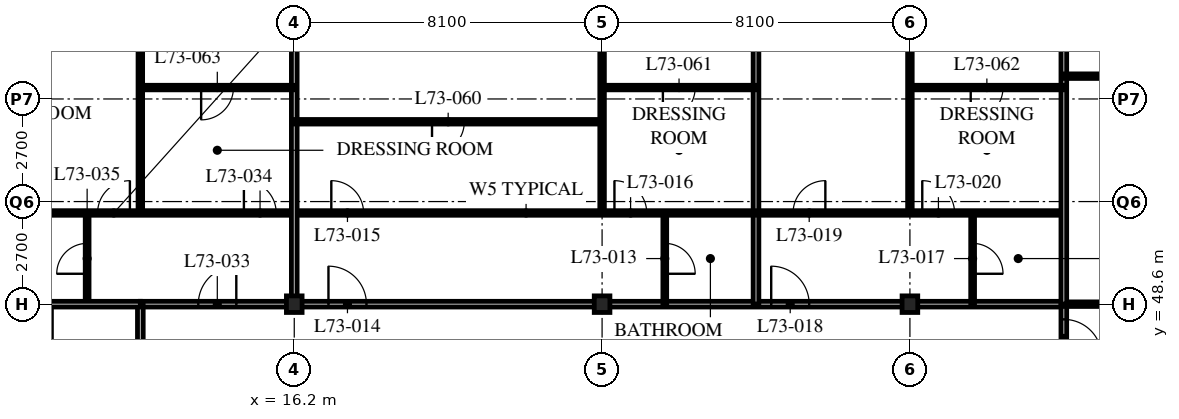
"""IFC4 building model, lengths in metres.
Left out: names, types, materials, properties, quantities, classifications, styles, units other than length and angle.
Written with IfcOpenShell. Run it as: python <this file> out.ifc"""

import sys

from ifc_helpers import new_model, si_unit, direction, frame, frame_2d, origin, origin_2d, place, context, subcontext, project, spatial, rectangle, i_section, extrude, element, fill, save


model = new_model("IFC4")
c1 = context("Model", 3, precision=1e-05, world=origin(), true_north=direction((0.0, 1.0)))
c2 = subcontext(c1, "Body", "Model", "MODEL_VIEW")
j1 = project(units=[si_unit("LENGTHUNIT", "METRE"), si_unit("PLANEANGLEUNIT", "RADIAN")], contexts=[c1])
p1 = place(None, origin())
s1 = spatial("IfcSite", under=j1, at=p1, CompositionType="ELEMENT")
p2 = place(p1, origin())
s2 = spatial("IfcBuilding", under=s1, at=p2, CompositionType="ELEMENT")
p3 = place(p2, frame((0.0, 0.0, 285.3)))
s3 = spatial("IfcBuildingStorey", under=s2, at=p3, CompositionType="ELEMENT", Elevation=285.3)
for number, where, z_axis, x_axis in (
    (1, (16.2, 48.6, 0.0), (0.0, 0.0, 1.0), (1.0, 0.0, 0.0)),
    (2, (24.3, 48.6, 0.0), (0.0, 0.0, 1.0), (1.0, 0.0, 0.0)),
    (3, (32.4, 48.6, 0.0), (0.0, 0.0, 1.0), (1.0, 0.0, 0.0)),
):
    element("IfcColumn", number, at=place(p3, frame(where, z_axis=z_axis, x_axis=x_axis)), inside=s3, PredefinedType="COLUMN", context=c2, shape_type="SweptSolid", body=[
        extrude(i_section(OverallWidth=0.412, OverallDepth=0.437, WebThickness=0.036, FlangeThickness=0.058, FilletRadius=0.015, at=origin_2d()), origin(), (0.0, 0.0, 1.0), 3.9),
    ])
p4 = place(p3, frame((12.15, 48.6, 0.0), z_axis=(0.0, 0.0, 1.0), x_axis=(1.0, 0.0, 0.0)))
e4 = element("IfcWall", 4, at=p4, inside=s3, PredefinedType="PARTITIONING", context=c2, shape_type="SweptSolid", body=[
    extrude(rectangle(XDim=24.3, YDim=0.15, at=frame_2d((12.15, 0.0))), origin(), (0.0, 0.0, 1.0), 3.078),
])
p5 = place(p4, frame((4.95, 0.0, 0.0)))
e5 = element("IfcOpeningElement", 5, at=p5, cuts=e4, PredefinedType="OPENING", context=c2, shape_type="SweptSolid", body=[
    extrude(rectangle(XDim=1.0, YDim=2.1, at=frame_2d((0.5, 1.05))), frame((0.0, 0.085, 0.0), z_axis=(0.0, -1.0, 0.0), x_axis=(1.0, 0.0, 0.0)), (0.0, 0.0, 1.0), 0.17),
])
p6 = place(p4, frame((16.6, 0.0, 0.0)))
e6 = element("IfcOpeningElement", 6, at=p6, cuts=e4, PredefinedType="OPENING", context=c2, shape_type="SweptSolid", body=[
    extrude(rectangle(XDim=1.0, YDim=2.1, at=frame_2d((0.5, 1.05))), frame((0.0, 0.085, 0.0), z_axis=(0.0, -1.0, 0.0), x_axis=(1.0, 0.0, 0.0)), (0.0, 0.0, 1.0), 0.17),
])
p7 = place(p4, frame((1.525, 0.0, 0.0)))
e7 = element("IfcOpeningElement", 7, at=p7, cuts=e4, PredefinedType="OPENING", context=c2, shape_type="SweptSolid", body=[
    extrude(rectangle(XDim=1.0, YDim=2.1, at=frame_2d((0.5, 1.05))), frame((0.0, 0.085, 0.0), z_axis=(0.0, -1.0, 0.0), x_axis=(1.0, 0.0, 0.0)), (0.0, 0.0, 1.0), 0.17),
])
p8 = place(p3, frame((12.15, 22.5, 0.0), z_axis=(0.0, 0.0, 1.0), x_axis=(0.0, 1.0, 0.0)))
e8 = element("IfcWall", 8, at=p8, inside=s3, PredefinedType="PARTITIONING", context=c2, shape_type="SweptSolid", body=[
    extrude(rectangle(XDim=26.1, YDim=0.15, at=frame_2d((13.05, 0.0))), origin(), (0.0, 0.0, 1.0), 3.69),
])
p9 = place(p8, frame((0.4, 0.0, 0.0)))
e9 = element("IfcOpeningElement", 9, at=p9, cuts=e8, PredefinedType="OPENING", context=c2, shape_type="SweptSolid", body=[
    extrude(rectangle(XDim=1.0, YDim=2.1, at=frame_2d((0.5, 1.05))), frame((0.0, 0.085, 0.0), z_axis=(0.0, -1.0, 0.0), x_axis=(1.0, 0.0, 0.0)), (0.0, 0.0, 1.0), 0.17),
])
p10 = place(p3, frame((36.45, 46.8, 0.0), z_axis=(0.0, 0.0, 1.0), x_axis=(0.0, 1.0, 0.0)))
e10 = element("IfcWall", 10, at=p10, inside=s3, PredefinedType="PARTITIONING", context=c2, shape_type="SweptSolid", body=[
    extrude(rectangle(XDim=1.8, YDim=0.15, at=frame_2d((0.9, 0.0))), origin(), (0.0, 0.0, 1.0), 3.69),
])
p11 = place(p10, frame((0.4, 0.0, 0.0)))
e11 = element("IfcOpeningElement", 11, at=p11, cuts=e10, PredefinedType="OPENING", context=c2, shape_type="SweptSolid", body=[
    extrude(rectangle(XDim=1.0, YDim=2.1, at=frame_2d((0.5, 1.05))), frame((0.0, 0.085, 0.0), z_axis=(0.0, -1.0, 0.0), x_axis=(1.0, 0.0, 0.0)), (0.0, 0.0, 1.0), 0.17),
])
p12 = place(p3, frame((25.95, 48.6, 0.0), z_axis=(0.0, 0.0, 1.0), x_axis=(0.0, 1.0, 0.0)))
e12 = element("IfcWall", 12, at=p12, inside=s3, PredefinedType="PARTITIONING", context=c2, shape_type="SweptSolid", body=[
    extrude(rectangle(XDim=2.4, YDim=0.1, at=frame_2d((1.2, 0.0))), origin(), (0.0, 0.0, 1.0), 3.69),
])
p13 = place(p12, frame((0.8, 0.0, 0.0)))
e13 = element("IfcOpeningElement", 13, at=p13, cuts=e12, PredefinedType="OPENING", context=c2, shape_type="SweptSolid", body=[
    extrude(rectangle(XDim=0.8, YDim=2.1, at=frame_2d((0.4, 1.05))), frame((0.0, 0.06, 0.0), z_axis=(0.0, -1.0, 0.0), x_axis=(1.0, 0.0, 0.0)), (0.0, 0.0, 1.0), 0.12),
])
p14 = place(p3, frame((24.3, 51.0, 0.0), z_axis=(0.0, 0.0, 1.0), x_axis=(0.0, 1.0, 0.0)))
e14 = element("IfcWall", 14, at=p14, inside=s3, PredefinedType="PARTITIONING", context=c2, shape_type="SweptSolid", body=[
    extrude(rectangle(XDim=13.5, YDim=0.12, at=frame_2d((6.75, 0.0))), origin(), (0.0, 0.0, 1.0), 3.078),
])
p15 = place(p3, frame((28.35, 48.6, 0.0), z_axis=(0.0, 0.0, 1.0), x_axis=(0.0, 1.0, 0.0)))
e15 = element("IfcWall", 15, at=p15, inside=s3, PredefinedType="PARTITIONING", context=c2, shape_type="SweptSolid", body=[
    extrude(rectangle(XDim=15.9, YDim=0.15, at=frame_2d((7.95, 0.0))), origin(), (0.0, 0.0, 1.0), 3.69),
])
p16 = place(p3, frame((34.05, 48.6, 0.0), z_axis=(0.0, 0.0, 1.0), x_axis=(0.0, 1.0, 0.0)))
e16 = element("IfcWall", 16, at=p16, inside=s3, PredefinedType="PARTITIONING", context=c2, shape_type="SweptSolid", body=[
    extrude(rectangle(XDim=2.4, YDim=0.1, at=frame_2d((1.2, 0.0))), origin(), (0.0, 0.0, 1.0), 3.69),
])
p17 = place(p16, frame((0.8, 0.0, 0.0)))
e17 = element("IfcOpeningElement", 17, at=p17, cuts=e16, PredefinedType="OPENING", context=c2, shape_type="SweptSolid", body=[
    extrude(rectangle(XDim=0.8, YDim=2.1, at=frame_2d((0.4, 1.05))), frame((0.0, 0.06, 0.0), z_axis=(0.0, -1.0, 0.0), x_axis=(1.0, 0.0, 0.0)), (0.0, 0.0, 1.0), 0.12),
])
p18 = place(p3, frame((32.4, 51.0, 0.0), z_axis=(0.0, 0.0, 1.0), x_axis=(0.0, 1.0, 0.0)))
e18 = element("IfcWall", 18, at=p18, inside=s3, PredefinedType="PARTITIONING", context=c2, shape_type="SweptSolid", body=[
    extrude(rectangle(XDim=13.5, YDim=0.12, at=frame_2d((6.75, 0.0))), origin(), (0.0, 0.0, 1.0), 3.078),
])
p19 = place(p3, frame((10.75, 48.6, 0.0), z_axis=(0.0, 0.0, 1.0), x_axis=(0.0, 1.0, 0.0)))
e19 = element("IfcWall", 19, at=p19, inside=s3, PredefinedType="PARTITIONING", context=c2, shape_type="SweptSolid", body=[
    extrude(rectangle(XDim=2.4, YDim=0.1, at=frame_2d((1.2, 0.0))), origin(), (0.0, 0.0, 1.0), 3.69),
])
p20 = place(p19, frame((0.8, 0.0, 0.0)))
e20 = element("IfcOpeningElement", 20, at=p20, cuts=e19, PredefinedType="OPENING", context=c2, shape_type="SweptSolid", body=[
    extrude(rectangle(XDim=0.8, YDim=2.1, at=frame_2d((0.4, 1.05))), frame((0.0, 0.06, 0.0), z_axis=(0.0, -1.0, 0.0), x_axis=(1.0, 0.0, 0.0)), (0.0, 0.0, 1.0), 0.12),
])
p21 = place(p3, frame((8.15, 51.0, 0.0), z_axis=(0.0, 0.0, 1.0), x_axis=(1.0, 0.0, 0.0)))
e21 = element("IfcWall", 21, at=p21, inside=s3, PredefinedType="PARTITIONING", context=c2, shape_type="SweptSolid", body=[
    extrude(rectangle(XDim=28.3, YDim=0.12, at=frame_2d((14.15, 0.0))), origin(), (0.0, 0.0, 1.0), 3.69),
])
p22 = place(p21, frame((9.025, 0.0, 0.0)))
e22 = element("IfcOpeningElement", 22, at=p22, cuts=e21, PredefinedType="OPENING", context=c2, shape_type="SweptSolid", body=[
    extrude(rectangle(XDim=0.85, YDim=2.1, at=frame_2d((0.425, 1.05))), frame((0.0, 0.07, 0.0), z_axis=(0.0, -1.0, 0.0), x_axis=(1.0, 0.0, 0.0)), (0.0, 0.0, 1.0), 0.14),
])
p23 = place(p21, frame((16.475, 0.0, 0.0)))
e23 = element("IfcOpeningElement", 23, at=p23, cuts=e21, PredefinedType="OPENING", context=c2, shape_type="SweptSolid", body=[
    extrude(rectangle(XDim=0.85, YDim=2.1, at=frame_2d((0.425, 1.05))), frame((0.0, 0.07, 0.0), z_axis=(0.0, -1.0, 0.0), x_axis=(1.0, 0.0, 0.0)), (0.0, 0.0, 1.0), 0.14),
])
p24 = place(p21, frame((21.175, 0.0, 0.0)))
e24 = element("IfcOpeningElement", 24, at=p24, cuts=e21, PredefinedType="OPENING", context=c2, shape_type="SweptSolid", body=[
    extrude(rectangle(XDim=0.85, YDim=2.1, at=frame_2d((0.425, 1.05))), frame((0.0, 0.07, 0.0), z_axis=(0.0, -1.0, 0.0), x_axis=(1.0, 0.0, 0.0)), (0.0, 0.0, 1.0), 0.14),
])
p25 = place(p21, frame((24.575, 0.0, 0.0)))
e25 = element("IfcOpeningElement", 25, at=p25, cuts=e21, PredefinedType="OPENING", context=c2, shape_type="SweptSolid", body=[
    extrude(rectangle(XDim=0.85, YDim=2.1, at=frame_2d((0.425, 1.05))), frame((0.0, 0.07, 0.0), z_axis=(0.0, -1.0, 0.0), x_axis=(1.0, 0.0, 0.0)), (0.0, 0.0, 1.0), 0.14),
])
p26 = place(p21, frame((6.725, 0.0, 0.0)))
e26 = element("IfcOpeningElement", 26, at=p26, cuts=e21, PredefinedType="OPENING", context=c2, shape_type="SweptSolid", body=[
    extrude(rectangle(XDim=0.85, YDim=2.1, at=frame_2d((0.425, 1.05))), frame((0.0, 0.07, 0.0), z_axis=(0.0, -1.0, 0.0), x_axis=(1.0, 0.0, 0.0)), (0.0, 0.0, 1.0), 0.14),
])
p27 = place(p21, frame((2.875, 0.0, 0.0)))
e27 = element("IfcOpeningElement", 27, at=p27, cuts=e21, PredefinedType="OPENING", context=c2, shape_type="SweptSolid", body=[
    extrude(rectangle(XDim=0.85, YDim=2.1, at=frame_2d((0.425, 1.05))), frame((0.0, 0.07, 0.0), z_axis=(0.0, -1.0, 0.0), x_axis=(1.0, 0.0, 0.0)), (0.0, 0.0, 1.0), 0.14),
])
p28 = place(p3, frame((12.15, 51.0, 0.0), z_axis=(0.0, 0.0, 1.0), x_axis=(0.0, 1.0, 0.0)))
e28 = element("IfcWall", 28, at=p28, inside=s3, PredefinedType="PARTITIONING", context=c2, shape_type="SweptSolid", body=[
    extrude(rectangle(XDim=13.5, YDim=0.12, at=frame_2d((6.75, 0.0))), origin(), (0.0, 0.0, 1.0), 3.69),
])
p29 = place(p3, frame((0.3, 48.6, 0.0), z_axis=(0.0, 0.0, 1.0), x_axis=(1.0, 0.0, 0.0)))
e29 = element("IfcWall", 29, at=p29, inside=s3, PredefinedType="PARTITIONING", context=c2, shape_type="SweptSolid", body=[
    extrude(rectangle(XDim=11.85, YDim=0.15, at=frame_2d((5.925, 0.0))), origin(), (0.0, 0.0, 1.0), 3.078),
])
p30 = place(p3, frame((16.2, 48.6, 0.0), z_axis=(0.0, 0.0, 1.0), x_axis=(0.0, 1.0, 0.0)))
e30 = element("IfcWall", 30, at=p30, inside=s3, PredefinedType="PARTITIONING", context=c2, shape_type="SweptSolid", body=[
    extrude(rectangle(XDim=15.9, YDim=0.15, at=frame_2d((7.95, 0.0))), origin(), (0.0, 0.0, 1.0), 3.078),
])
p31 = place(p3, frame((36.45, 48.6, 0.0), z_axis=(0.0, 0.0, 1.0), x_axis=(1.0, 0.0, 0.0)))
e31 = element("IfcWall", 31, at=p31, inside=s3, PredefinedType="PARTITIONING", context=c2, shape_type="SweptSolid", body=[
    extrude(rectangle(XDim=6.45, YDim=0.12, at=frame_2d((3.225, 0.0))), origin(), (0.0, 0.0, 1.0), 3.078),
])
p32 = place(p31, frame((2.3, 0.0, 0.0)))
e32 = element("IfcOpeningElement", 32, at=p32, cuts=e31, PredefinedType="OPENING", context=c2, shape_type="SweptSolid", body=[
    extrude(rectangle(XDim=0.85, YDim=2.1, at=frame_2d((0.425, 1.05))), frame((0.0, 0.07, 0.0), z_axis=(0.0, -1.0, 0.0), x_axis=(1.0, 0.0, 0.0)), (0.0, 0.0, 1.0), 0.14),
])
p33 = place(p3, frame((36.45, 64.5, 0.0), z_axis=(0.0, 0.0, 1.0), x_axis=(0.0, -1.0, 0.0)))
e33 = element("IfcWall", 33, at=p33, inside=s3, PredefinedType="PARTITIONING", context=c2, shape_type="SweptSolid", body=[
    extrude(rectangle(XDim=15.9, YDim=0.15, at=frame_2d((7.95, 0.0))), origin(), (0.0, 0.0, 1.0), 3.69),
])
p34 = place(p3, frame((36.45, 54.6, 0.0), z_axis=(0.0, 0.0, 1.0), x_axis=(1.0, 0.0, 0.0)))
e34 = element("IfcWall", 34, at=p34, inside=s3, PredefinedType="PARTITIONING", context=c2, shape_type="SweptSolid", body=[
    extrude(rectangle(XDim=19.95, YDim=0.12, at=frame_2d((9.975, 0.0))), origin(), (0.0, 0.0, 1.0), 3.69),
])
p35 = place(p34, frame((1.675, 0.0, 0.0)))
e35 = element("IfcOpeningElement", 35, at=p35, cuts=e34, PredefinedType="OPENING", context=c2, shape_type="SweptSolid", body=[
    extrude(rectangle(XDim=0.85, YDim=2.1, at=frame_2d((0.425, 1.05))), frame((0.0, 0.07, 0.0), z_axis=(0.0, -1.0, 0.0), x_axis=(1.0, 0.0, 0.0)), (0.0, 0.0, 1.0), 0.14),
])
p36 = place(p3, frame((16.2, 53.4, 0.0), z_axis=(0.0, 0.0, 1.0), x_axis=(1.0, 0.0, 0.0)))
e36 = element("IfcWall", 36, at=p36, inside=s3, PredefinedType="PARTITIONING", context=c2, shape_type="SweptSolid", body=[
    extrude(rectangle(XDim=8.1, YDim=0.12, at=frame_2d((4.05, 0.0))), origin(), (0.0, 0.0, 1.0), 3.69),
])
p37 = place(p36, frame((3.625, 0.0, 0.0)))
e37 = element("IfcOpeningElement", 37, at=p37, cuts=e36, PredefinedType="OPENING", context=c2, shape_type="SweptSolid", body=[
    extrude(rectangle(XDim=0.85, YDim=2.1, at=frame_2d((0.425, 1.05))), frame((0.0, 0.07, 0.0), z_axis=(0.0, -1.0, 0.0), x_axis=(1.0, 0.0, 0.0)), (0.0, 0.0, 1.0), 0.14),
])
p38 = place(p3, frame((24.3, 54.3, 0.0), z_axis=(0.0, 0.0, 1.0), x_axis=(1.0, 0.0, 0.0)))
e38 = element("IfcWall", 38, at=p38, inside=s3, PredefinedType="PARTITIONING", context=c2, shape_type="SweptSolid", body=[
    extrude(rectangle(XDim=4.05, YDim=0.12, at=frame_2d((2.025, 0.0))), origin(), (0.0, 0.0, 1.0), 3.69),
])
p39 = place(p38, frame((1.6, 0.0, 0.0)))
e39 = element("IfcOpeningElement", 39, at=p39, cuts=e38, PredefinedType="OPENING", context=c2, shape_type="SweptSolid", body=[
    extrude(rectangle(XDim=0.85, YDim=2.1, at=frame_2d((0.425, 1.05))), frame((0.0, 0.07, 0.0), z_axis=(0.0, -1.0, 0.0), x_axis=(1.0, 0.0, 0.0)), (0.0, 0.0, 1.0), 0.14),
])
p40 = place(p3, frame((32.4, 54.3, 0.0), z_axis=(0.0, 0.0, 1.0), x_axis=(1.0, 0.0, 0.0)))
e40 = element("IfcWall", 40, at=p40, inside=s3, PredefinedType="PARTITIONING", context=c2, shape_type="SweptSolid", body=[
    extrude(rectangle(XDim=4.05, YDim=0.12, at=frame_2d((2.025, 0.0))), origin(), (0.0, 0.0, 1.0), 3.69),
])
p41 = place(p40, frame((1.6, 0.0, 0.0)))
e41 = element("IfcOpeningElement", 41, at=p41, cuts=e40, PredefinedType="OPENING", context=c2, shape_type="SweptSolid", body=[
    extrude(rectangle(XDim=0.85, YDim=2.1, at=frame_2d((0.425, 1.05))), frame((0.0, 0.07, 0.0), z_axis=(0.0, -1.0, 0.0), x_axis=(1.0, 0.0, 0.0)), (0.0, 0.0, 1.0), 0.14),
])
p42 = place(p3, frame((12.15, 54.3, 0.0), z_axis=(0.0, 0.0, 1.0), x_axis=(1.0, 0.0, 0.0)))
e42 = element("IfcWall", 42, at=p42, inside=s3, PredefinedType="PARTITIONING", context=c2, shape_type="SweptSolid", body=[
    extrude(rectangle(XDim=4.05, YDim=0.12, at=frame_2d((2.025, 0.0))), origin(), (0.0, 0.0, 1.0), 3.69),
])
p43 = place(p42, frame((1.6, 0.0, 0.0)))
e43 = element("IfcOpeningElement", 43, at=p43, cuts=e42, PredefinedType="OPENING", context=c2, shape_type="SweptSolid", body=[
    extrude(rectangle(XDim=0.85, YDim=2.1, at=frame_2d((0.425, 1.05))), frame((0.0, 0.07, 0.0), z_axis=(0.0, -1.0, 0.0), x_axis=(1.0, 0.0, 0.0)), (0.0, 0.0, 1.0), 0.14),
])
p44 = place(p13, origin())
e44 = element("IfcDoor", 44, at=p44, inside=s3, OperationType="SINGLE_SWING_RIGHT", PredefinedType="DOOR", context=c2, shape_type="SweptSolid", body=[
    extrude(rectangle(XDim=0.8, YDim=2.1, at=frame_2d((0.4, 1.05))), frame((0.0, 0.025, 0.0), z_axis=(0.0, -1.0, 0.0), x_axis=(1.0, 0.0, 0.0)), (0.0, 0.0, 1.0), 0.05),
])
fill(e13, e44)
p45 = place(p5, origin())
e45 = element("IfcDoor", 45, at=p45, inside=s3, OperationType="SINGLE_SWING_LEFT", PredefinedType="DOOR", context=c2, shape_type="SweptSolid", body=[
    extrude(rectangle(XDim=1.0, YDim=2.1, at=frame_2d((0.5, 1.05))), frame((0.0, 0.025, 0.0), z_axis=(0.0, -1.0, 0.0), x_axis=(1.0, 0.0, 0.0)), (0.0, 0.0, 1.0), 0.05),
])
fill(e5, e45)
p46 = place(p22, origin())
e46 = element("IfcDoor", 46, at=p46, inside=s3, OperationType="SINGLE_SWING_LEFT", PredefinedType="DOOR", context=c2, shape_type="SweptSolid", body=[
    extrude(rectangle(XDim=0.85, YDim=2.1, at=frame_2d((0.425, 1.05))), frame((0.0, 0.025, 0.0), z_axis=(0.0, -1.0, 0.0), x_axis=(1.0, 0.0, 0.0)), (0.0, 0.0, 1.0), 0.05),
])
fill(e22, e46)
p47 = place(p23, origin())
e47 = element("IfcDoor", 47, at=p47, inside=s3, OperationType="SINGLE_SWING_LEFT", PredefinedType="DOOR", context=c2, shape_type="SweptSolid", body=[
    extrude(rectangle(XDim=0.85, YDim=2.1, at=frame_2d((0.425, 1.05))), frame((0.0, 0.025, 0.0), z_axis=(0.0, -1.0, 0.0), x_axis=(1.0, 0.0, 0.0)), (0.0, 0.0, 1.0), 0.05),
])
fill(e23, e47)
p48 = place(p17, origin())
e48 = element("IfcDoor", 48, at=p48, inside=s3, OperationType="SINGLE_SWING_RIGHT", PredefinedType="DOOR", context=c2, shape_type="SweptSolid", body=[
    extrude(rectangle(XDim=0.8, YDim=2.1, at=frame_2d((0.4, 1.05))), frame((0.0, 0.025, 0.0), z_axis=(0.0, -1.0, 0.0), x_axis=(1.0, 0.0, 0.0)), (0.0, 0.0, 1.0), 0.05),
])
fill(e17, e48)
p49 = place(p6, origin())
e49 = element("IfcDoor", 49, at=p49, inside=s3, OperationType="SINGLE_SWING_LEFT", PredefinedType="DOOR", context=c2, shape_type="SweptSolid", body=[
    extrude(rectangle(XDim=1.0, YDim=2.1, at=frame_2d((0.5, 1.05))), frame((0.0, 0.025, 0.0), z_axis=(0.0, -1.0, 0.0), x_axis=(1.0, 0.0, 0.0)), (0.0, 0.0, 1.0), 0.05),
])
fill(e6, e49)
p50 = place(p24, origin())
e50 = element("IfcDoor", 50, at=p50, inside=s3, OperationType="SINGLE_SWING_RIGHT", PredefinedType="DOOR", context=c2, shape_type="SweptSolid", body=[
    extrude(rectangle(XDim=0.85, YDim=2.1, at=frame_2d((0.425, 1.05))), frame((0.0, 0.025, 0.0), z_axis=(0.0, -1.0, 0.0), x_axis=(1.0, 0.0, 0.0)), (0.0, 0.0, 1.0), 0.05),
])
fill(e24, e50)
p51 = place(p25, origin())
e51 = element("IfcDoor", 51, at=p51, inside=s3, OperationType="SINGLE_SWING_LEFT", PredefinedType="DOOR", context=c2, shape_type="SweptSolid", body=[
    extrude(rectangle(XDim=0.85, YDim=2.1, at=frame_2d((0.425, 1.05))), frame((0.0, 0.025, 0.0), z_axis=(0.0, -1.0, 0.0), x_axis=(1.0, 0.0, 0.0)), (0.0, 0.0, 1.0), 0.05),
])
fill(e25, e51)
p52 = place(p7, origin())
e52 = element("IfcDoor", 52, at=p52, inside=s3, OperationType="SINGLE_SWING_RIGHT", PredefinedType="DOOR", context=c2, shape_type="SweptSolid", body=[
    extrude(rectangle(XDim=1.0, YDim=2.1, at=frame_2d((0.5, 1.05))), frame((0.0, 0.025, 0.0), z_axis=(0.0, -1.0, 0.0), x_axis=(1.0, 0.0, 0.0)), (0.0, 0.0, 1.0), 0.05),
])
fill(e7, e52)
p53 = place(p26, origin())
e53 = element("IfcDoor", 53, at=p53, inside=s3, OperationType="SINGLE_SWING_LEFT", PredefinedType="DOOR", context=c2, shape_type="SweptSolid", body=[
    extrude(rectangle(XDim=0.85, YDim=2.1, at=frame_2d((0.425, 1.05))), frame((0.0, 0.025, 0.0), z_axis=(0.0, -1.0, 0.0), x_axis=(1.0, 0.0, 0.0)), (0.0, 0.0, 1.0), 0.05),
])
fill(e26, e53)
p54 = place(p20, origin())
e54 = element("IfcDoor", 54, at=p54, inside=s3, OperationType="SINGLE_SWING_LEFT", PredefinedType="DOOR", context=c2, shape_type="SweptSolid", body=[
    extrude(rectangle(XDim=0.8, YDim=2.1, at=frame_2d((0.4, 1.05))), frame((0.0, 0.025, 0.0), z_axis=(0.0, -1.0, 0.0), x_axis=(1.0, 0.0, 0.0)), (0.0, 0.0, 1.0), 0.05),
])
fill(e20, e54)
p55 = place(p27, origin())
e55 = element("IfcDoor", 55, at=p55, inside=s3, OperationType="SINGLE_SWING_RIGHT", PredefinedType="DOOR", context=c2, shape_type="SweptSolid", body=[
    extrude(rectangle(XDim=0.85, YDim=2.1, at=frame_2d((0.425, 1.05))), frame((0.0, 0.025, 0.0), z_axis=(0.0, -1.0, 0.0), x_axis=(1.0, 0.0, 0.0)), (0.0, 0.0, 1.0), 0.05),
])
fill(e27, e55)
p56 = place(p11, origin())
e56 = element("IfcDoor", 56, at=p56, inside=s3, OperationType="SINGLE_SWING_RIGHT", PredefinedType="DOOR", context=c2, shape_type="SweptSolid", body=[
    extrude(rectangle(XDim=1.0, YDim=2.1, at=frame_2d((0.5, 1.05))), frame((0.0, 0.025, 0.0), z_axis=(0.0, -1.0, 0.0), x_axis=(1.0, 0.0, 0.0)), (0.0, 0.0, 1.0), 0.05),
])
fill(e11, e56)
p57 = place(p37, origin())
e57 = element("IfcDoor", 57, at=p57, inside=s3, OperationType="SINGLE_SWING_RIGHT", PredefinedType="DOOR", context=c2, shape_type="SweptSolid", body=[
    extrude(rectangle(XDim=0.85, YDim=2.1, at=frame_2d((0.425, 1.05))), frame((0.0, 0.025, 0.0), z_axis=(0.0, -1.0, 0.0), x_axis=(1.0, 0.0, 0.0)), (0.0, 0.0, 1.0), 0.05),
])
fill(e37, e57)
p58 = place(p39, origin())
e58 = element("IfcDoor", 58, at=p58, inside=s3, OperationType="SINGLE_SWING_RIGHT", PredefinedType="DOOR", context=c2, shape_type="SweptSolid", body=[
    extrude(rectangle(XDim=0.85, YDim=2.1, at=frame_2d((0.425, 1.05))), frame((0.0, 0.025, 0.0), z_axis=(0.0, -1.0, 0.0), x_axis=(1.0, 0.0, 0.0)), (0.0, 0.0, 1.0), 0.05),
])
fill(e39, e58)
p59 = place(p41, origin())
e59 = element("IfcDoor", 59, at=p59, inside=s3, OperationType="SINGLE_SWING_RIGHT", PredefinedType="DOOR", context=c2, shape_type="SweptSolid", body=[
    extrude(rectangle(XDim=0.85, YDim=2.1, at=frame_2d((0.425, 1.05))), frame((0.0, 0.025, 0.0), z_axis=(0.0, -1.0, 0.0), x_axis=(1.0, 0.0, 0.0)), (0.0, 0.0, 1.0), 0.05),
])
fill(e41, e59)
p60 = place(p43, origin())
e60 = element("IfcDoor", 60, at=p60, inside=s3, OperationType="SINGLE_SWING_RIGHT", PredefinedType="DOOR", context=c2, shape_type="SweptSolid", body=[
    extrude(rectangle(XDim=0.85, YDim=2.1, at=frame_2d((0.425, 1.05))), frame((0.0, 0.025, 0.0), z_axis=(0.0, -1.0, 0.0), x_axis=(1.0, 0.0, 0.0)), (0.0, 0.0, 1.0), 0.05),
])
fill(e43, e60)
save(model, sys.argv[1])
